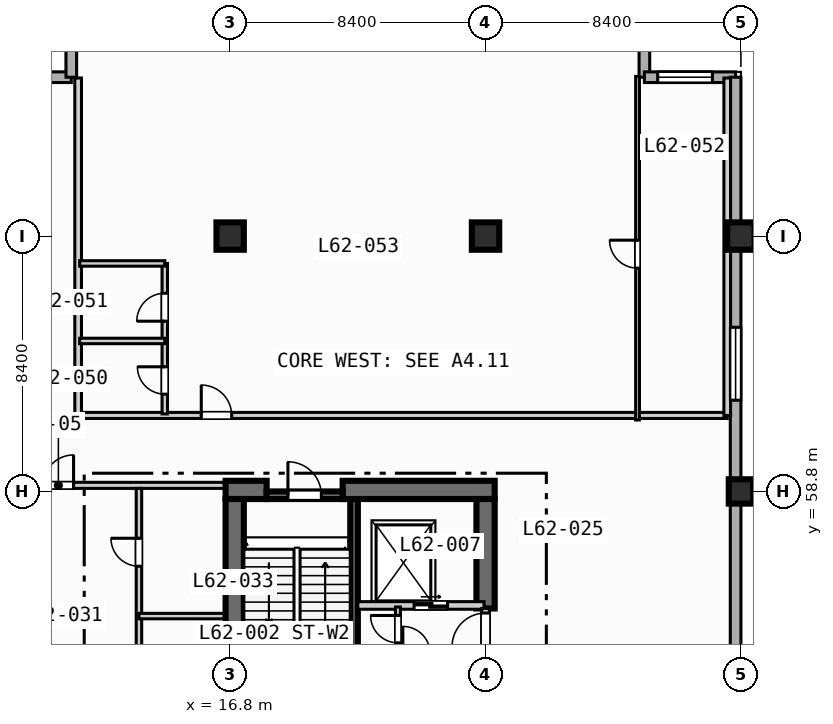
"""IFC4 building model, lengths in metres.
Left out: names, types, materials, properties, quantities, classifications, styles, units other than length and angle.
Written with IfcOpenShell. Run it as: python <this file> out.ifc"""

import sys

from ifc_helpers import new_model, si_unit, direction, frame, frame_2d, origin, origin_2d, place, context, subcontext, project, spatial, rectangle, extrude, element, fill, save


model = new_model("IFC4")
c1 = context("Model", 3, precision=1e-05, world=origin(), true_north=direction((0.0, 1.0)))
c2 = subcontext(c1, "Body", "Model", "MODEL_VIEW")
j1 = project(units=[si_unit("LENGTHUNIT", "METRE"), si_unit("PLANEANGLEUNIT", "RADIAN")], contexts=[c1])
p1 = place(None, origin())
s1 = spatial("IfcSite", under=j1, at=p1, CompositionType="ELEMENT")
p2 = place(p1, origin())
s2 = spatial("IfcBuilding", under=s1, at=p2, CompositionType="ELEMENT")
p3 = place(p2, frame((0.0, 0.0, 252.7)))
s3 = spatial("IfcBuildingStorey", under=s2, at=p3, CompositionType="ELEMENT", Elevation=252.7)
p4 = place(p3, frame((20.875, 50.5, 0.0), z_axis=(0.0, 0.0, 1.0), x_axis=(0.0, 1.0, 0.0)))
e1 = element("IfcWall", 1, at=p4, inside=s3, PredefinedType="SOLIDWALL", context=c2, shape_type="SweptSolid", body=[
    extrude(rectangle(XDim=8.05, YDim=0.25, at=frame_2d((4.025, 0.0))), origin(), (0.0, 0.0, 1.0), 3.47),
])
p5 = place(p3, frame((16.65, 58.85, 0.0), z_axis=(0.0, 0.0, 1.0), x_axis=(1.0, 0.0, 0.0)))
e2 = element("IfcWall", 2, at=p5, inside=s3, PredefinedType="SHEAR", context=c2, shape_type="SweptSolid", body=[
    extrude(rectangle(XDim=1.35, YDim=0.6, at=frame_2d((0.675, 0.0))), origin(), (0.0, 0.0, 1.0), 3.47),
])
p6 = place(p3, frame((20.5, 58.85, 0.0), z_axis=(0.0, 0.0, 1.0), x_axis=(1.0, 0.0, 0.0)))
e3 = element("IfcWall", 3, at=p6, inside=s3, PredefinedType="SHEAR", context=c2, shape_type="SweptSolid", body=[
    extrude(rectangle(XDim=5.0, YDim=0.6, at=frame_2d((2.5, 0.0))), origin(), (0.0, 0.0, 1.0), 3.47),
])
p7 = place(p3, frame((16.95, 42.2, 0.0), z_axis=(0.0, 0.0, 1.0), x_axis=(0.0, 1.0, 0.0)))
e4 = element("IfcWall", 4, at=p7, inside=s3, PredefinedType="SHEAR", context=c2, shape_type="SweptSolid", body=[
    extrude(rectangle(XDim=16.35, YDim=0.6, at=frame_2d((8.175, 0.0))), origin(), (0.0, 0.0, 1.0), 3.47),
])
p8 = place(p3, frame((25.2, 54.95, 0.0), z_axis=(0.0, 0.0, 1.0), x_axis=(0.0, 1.0, 0.0)))
e5 = element("IfcWall", 5, at=p8, inside=s3, PredefinedType="SHEAR", context=c2, shape_type="SweptSolid", body=[
    extrude(rectangle(XDim=3.6, YDim=0.6, at=frame_2d((1.8, 0.0))), origin(), (0.0, 0.0, 1.0), 3.47),
])
for number, where, z_axis, x_axis in (
    (6, (16.8, 67.2, 0.0), (0.0, 0.0, 1.0), (1.0, 0.0, 0.0)),
    (7, (25.2, 67.2, 0.0), (0.0, 0.0, 1.0), (1.0, 0.0, 0.0)),
):
    element("IfcColumn", number, at=place(p3, frame(where, z_axis=z_axis, x_axis=x_axis)), inside=s3, PredefinedType="COLUMN", context=c2, shape_type="SweptSolid", body=[
        extrude(rectangle(XDim=0.9, YDim=0.9, at=origin_2d()), origin(), (0.0, 0.0, 1.0), 3.7),
    ])
p9 = place(p3, frame((33.6, 58.8, 0.0), z_axis=(0.0, 0.0, 1.0), x_axis=(1.0, 0.0, 0.0)))
e8 = element("IfcColumn", 8, at=p9, inside=s3, PredefinedType="COLUMN", context=c2, shape_type="SweptSolid", body=[
    extrude(rectangle(XDim=0.8, YDim=0.8, at=origin_2d()), origin(), (0.0, 0.0, 1.0), 3.7),
])
p10 = place(p3, frame((33.6, 67.2, 0.0), z_axis=(0.0, 0.0, 1.0), x_axis=(1.0, 0.0, 0.0)))
e9 = element("IfcColumn", 9, at=p10, inside=s3, PredefinedType="COLUMN", context=c2, shape_type="SweptSolid", body=[
    extrude(rectangle(XDim=0.9, YDim=0.9, at=origin_2d()), origin(), (0.0, 0.0, 1.0), 3.7),
])
for number, where, z_axis, x_axis in (
    (10, (8.575, 72.425, 0.0), (0.0, 0.0, 1.0), (1.0, 0.0, 0.0)),
    (11, (11.575, 72.425, 0.0), (0.0, 0.0, 1.0), (0.0, 1.0, 0.0)),
    (12, (30.425, 75.425, 0.0), (0.0, 0.0, 1.0), (0.0, -1.0, 0.0)),
):
    element("IfcWall", number, at=place(p3, frame(where, z_axis=z_axis, x_axis=x_axis)), inside=s3, PredefinedType="STANDARD", context=c2, shape_type="SweptSolid", body=[
        extrude(rectangle(XDim=3.0, YDim=0.35, at=frame_2d((1.5, 0.0))), origin(), (0.0, 0.0, 1.0), 3.47),
    ])
p11 = place(p3, frame((30.425, 72.425, 0.0), z_axis=(0.0, 0.0, 1.0), x_axis=(1.0, 0.0, 0.0)))
e13 = element("IfcWall", 13, at=p11, inside=s3, PredefinedType="STANDARD", context=c2, shape_type="SweptSolid", body=[
    extrude(rectangle(XDim=3.0, YDim=0.35, at=frame_2d((1.5, 0.0))), origin(), (0.0, 0.0, 1.0), 3.47),
])
p12 = place(p11, frame((0.438, 0.0, 0.85)))
e14 = element("IfcOpeningElement", 14, at=p12, cuts=e13, PredefinedType="OPENING", context=c2, shape_type="SweptSolid", body=[
    extrude(rectangle(XDim=1.8, YDim=1.8, at=frame_2d((0.9, 0.9))), frame((0.0, 0.185, 0.0), z_axis=(0.0, -1.0, 0.0), x_axis=(1.0, 0.0, 0.0)), (0.0, 0.0, 1.0), 0.37),
])
p13 = place(p3, frame((33.425, 72.425, 0.0), z_axis=(0.0, 0.0, 1.0), x_axis=(0.0, -1.0, 0.0)))
e15 = element("IfcWall", 15, at=p13, inside=s3, PredefinedType="STANDARD", context=c2, shape_type="SweptSolid", body=[
    extrude(rectangle(XDim=39.0, YDim=0.35, at=frame_2d((19.5, 0.0))), origin(), (0.0, 0.0, 1.0), 3.47),
])
p14 = place(p13, frame((33.725, 0.0, 0.85)))
e16 = element("IfcOpeningElement", 16, at=p14, cuts=e15, PredefinedType="OPENING", context=c2, shape_type="SweptSolid", body=[
    extrude(rectangle(XDim=1.8, YDim=1.8, at=frame_2d((0.9, 0.9))), frame((0.0, 0.185, 0.0), z_axis=(0.0, -1.0, 0.0), x_axis=(1.0, 0.0, 0.0)), (0.0, 0.0, 1.0), 0.37),
])
p15 = place(p13, frame((8.225, 0.0, 0.85)))
e17 = element("IfcOpeningElement", 17, at=p15, cuts=e15, PredefinedType="OPENING", context=c2, shape_type="SweptSolid", body=[
    extrude(rectangle(XDim=2.4, YDim=1.95, at=frame_2d((1.2, 0.975))), frame((0.0, 0.185, 0.0), z_axis=(0.0, -1.0, 0.0), x_axis=(1.0, 0.0, 0.0)), (0.0, 0.0, 1.0), 0.37),
])
p16 = place(p3, frame((18.0, 58.675, 0.0), z_axis=(0.0, 0.0, 1.0), x_axis=(1.0, 0.0, 0.0)))
e18 = element("IfcWall", 18, at=p16, inside=s3, PredefinedType="SOLIDWALL", context=c2, shape_type="SweptSolid", body=[
    extrude(rectangle(XDim=2.5, YDim=0.25, at=frame_2d((1.25, 0.0))), origin(), (0.0, 0.0, 1.0), 3.47),
])
p17 = place(p16, frame((0.7, 0.0, 0.0)))
e19 = element("IfcOpeningElement", 19, at=p17, cuts=e18, PredefinedType="OPENING", context=c2, shape_type="SweptSolid", body=[
    extrude(rectangle(XDim=1.1, YDim=2.15, at=frame_2d((0.55, 1.075))), frame((0.0, 0.135, 0.0), z_axis=(0.0, -1.0, 0.0), x_axis=(1.0, 0.0, 0.0)), (0.0, 0.0, 1.0), 0.27),
])
p18 = place(p3, frame((21.0, 55.05, 0.0), z_axis=(0.0, 0.0, 1.0), x_axis=(1.0, 0.0, 0.0)))
e20 = element("IfcWall", 20, at=p18, inside=s3, PredefinedType="SOLIDWALL", context=c2, shape_type="SweptSolid", body=[
    extrude(rectangle(XDim=4.15, YDim=0.25, at=frame_2d((2.075, 0.0))), origin(), (0.0, 0.0, 1.0), 3.47),
])
p19 = place(p18, frame((1.85, 0.0, 0.0)))
e21 = element("IfcOpeningElement", 21, at=p19, cuts=e20, PredefinedType="OPENING", context=c2, shape_type="SweptSolid", body=[
    extrude(rectangle(XDim=1.1, YDim=2.15, at=frame_2d((0.55, 1.075))), frame((0.0, 0.135, 0.0), z_axis=(0.0, -1.0, 0.0), x_axis=(1.0, 0.0, 0.0)), (0.0, 0.0, 1.0), 0.27),
])
p20 = place(p3, frame((25.2, 53.55, 0.0), z_axis=(0.0, 0.0, 1.0), x_axis=(0.0, 1.0, 0.0)))
e22 = element("IfcWall", 22, at=p20, inside=s3, PredefinedType="SOLIDWALL", context=c2, shape_type="SweptSolid", body=[
    extrude(rectangle(XDim=1.4, YDim=0.25, at=frame_2d((0.7, 0.0))), origin(), (0.0, 0.0, 1.0), 3.47),
])
p21 = place(p20, frame((0.15, 0.0, 0.0)))
e23 = element("IfcOpeningElement", 23, at=p21, cuts=e22, PredefinedType="OPENING", context=c2, shape_type="SweptSolid", body=[
    extrude(rectangle(XDim=1.1, YDim=2.15, at=frame_2d((0.55, 1.075))), frame((0.0, 0.135, 0.0), z_axis=(0.0, -1.0, 0.0), x_axis=(1.0, 0.0, 0.0)), (0.0, 0.0, 1.0), 0.27),
])
p22 = place(p3, frame((22.32, 53.56, 0.0), z_axis=(0.0, 0.0, 1.0), x_axis=(0.0, 1.0, 0.0)))
e24 = element("IfcWall", 24, at=p22, inside=s3, PredefinedType="PARTITIONING", context=c2, shape_type="SweptSolid", body=[
    extrude(rectangle(XDim=1.44, YDim=0.16, at=frame_2d((0.72, 0.0))), origin(), (0.0, 0.0, 1.0), 3.47),
])
p23 = place(p22, frame((0.26, 0.0, 0.0)))
e25 = element("IfcOpeningElement", 25, at=p23, cuts=e24, PredefinedType="OPENING", context=c2, shape_type="SweptSolid", body=[
    extrude(rectangle(XDim=0.9, YDim=2.1, at=frame_2d((0.45, 1.05))), frame((0.0, 0.09, 0.0), z_axis=(0.0, -1.0, 0.0), x_axis=(1.0, 0.0, 0.0)), (0.0, 0.0, 1.0), 0.18),
])
p24 = place(p3, frame((8.65, 59.0, 0.0), z_axis=(0.0, 0.0, 1.0), x_axis=(1.0, 0.0, 0.0)))
e26 = element("IfcWall", 26, at=p24, inside=s3, PredefinedType="PARTITIONING", context=c2, shape_type="SweptSolid", body=[
    extrude(rectangle(XDim=7.95, YDim=0.2, at=frame_2d((3.975, 0.0))), origin(), (0.0, 0.0, 1.0), 2.82),
])
p25 = place(p24, frame((2.0, 0.0, 0.0)))
e27 = element("IfcOpeningElement", 27, at=p25, cuts=e26, PredefinedType="OPENING", context=c2, shape_type="SweptSolid", body=[
    extrude(rectangle(XDim=1.0, YDim=2.15, at=frame_2d((0.5, 1.075))), frame((0.0, 0.11, 0.0), z_axis=(0.0, -1.0, 0.0), x_axis=(1.0, 0.0, 0.0)), (0.0, 0.0, 1.0), 0.22),
])
p26 = place(p3, frame((13.8, 50.5, 0.0), z_axis=(0.0, 0.0, 1.0), x_axis=(0.0, 1.0, 0.0)))
e28 = element("IfcWall", 28, at=p26, inside=s3, PredefinedType="PLUMBINGWALL", context=c2, shape_type="SweptSolid", body=[
    extrude(rectangle(XDim=8.4, YDim=0.18, at=frame_2d((4.2, 0.0))), origin(), (0.0, 0.0, 1.0), 3.47),
])
p27 = place(p26, frame((1.65, 0.0, 0.0)))
e29 = element("IfcOpeningElement", 29, at=p27, cuts=e28, PredefinedType="OPENING", context=c2, shape_type="SweptSolid", body=[
    extrude(rectangle(XDim=0.9, YDim=2.1, at=frame_2d((0.45, 1.05))), frame((0.0, 0.1, 0.0), z_axis=(0.0, -1.0, 0.0), x_axis=(1.0, 0.0, 0.0)), (0.0, 0.0, 1.0), 0.2),
])
p28 = place(p26, frame((5.84, 0.0, 0.0)))
e30 = element("IfcOpeningElement", 30, at=p28, cuts=e28, PredefinedType="OPENING", context=c2, shape_type="SweptSolid", body=[
    extrude(rectangle(XDim=0.92, YDim=2.1, at=frame_2d((0.46, 1.05))), frame((0.0, 0.1, 0.0), z_axis=(0.0, -1.0, 0.0), x_axis=(1.0, 0.0, 0.0)), (0.0, 0.0, 1.0), 0.2),
])
p29 = place(p3, frame((13.8, 54.7, 0.0), z_axis=(0.0, 0.0, 1.0), x_axis=(1.0, 0.0, 0.0)))
e31 = element("IfcWall", 31, at=p29, inside=s3, PredefinedType="PLUMBINGWALL", context=c2, shape_type="SweptSolid", body=[
    extrude(rectangle(XDim=2.8, YDim=0.18, at=frame_2d((1.4, 0.0))), origin(), (0.0, 0.0, 1.0), 3.47),
])
p30 = place(p3, frame((11.8, 61.3, 0.0), z_axis=(0.0, 0.0, 1.0), x_axis=(1.0, 0.0, 0.0)))
e32 = element("IfcWall", 32, at=p30, inside=s3, PredefinedType="PARTITIONING", context=c2, shape_type="SweptSolid", body=[
    extrude(rectangle(XDim=21.35, YDim=0.2, at=frame_2d((10.675, 0.0))), origin(), (0.0, 0.0, 1.0), 3.47),
])
p31 = place(p30, frame((4.05, 0.0, 0.0)))
e33 = element("IfcOpeningElement", 33, at=p31, cuts=e32, PredefinedType="OPENING", context=c2, shape_type="SweptSolid", body=[
    extrude(rectangle(XDim=1.0, YDim=2.15, at=frame_2d((0.5, 1.075))), frame((0.0, 0.11, 0.0), z_axis=(0.0, -1.0, 0.0), x_axis=(1.0, 0.0, 0.0)), (0.0, 0.0, 1.0), 0.22),
])
for number, where, z_axis, x_axis in (
    (34, (33.15, 61.3, 0.0), (0.0, 0.0, 1.0), (0.0, 1.0, 0.0)),
    (35, (11.8, 61.3, 0.0), (0.0, 0.0, 1.0), (0.0, 1.0, 0.0)),
):
    element("IfcWall", number, at=place(p3, frame(where, z_axis=z_axis, x_axis=x_axis)), inside=s3, PredefinedType="PARTITIONING", context=c2, shape_type="SweptSolid", body=[
        extrude(rectangle(XDim=11.1, YDim=0.22, at=frame_2d((5.55, 0.0))), origin(), (0.0, 0.0, 1.0), 3.47),
    ])
p32 = place(p3, frame((14.65, 61.35, 0.0), z_axis=(0.0, 0.0, 1.0), x_axis=(0.0, 1.0, 0.0)))
e36 = element("IfcWall", 36, at=p32, inside=s3, PredefinedType="PLUMBINGWALL", context=c2, shape_type="SweptSolid", body=[
    extrude(rectangle(XDim=4.95, YDim=0.18, at=frame_2d((2.475, 0.0))), origin(), (0.0, 0.0, 1.0), 3.47),
])
p33 = place(p32, frame((0.65, 0.0, 0.0)))
e37 = element("IfcOpeningElement", 37, at=p33, cuts=e36, PredefinedType="OPENING", context=c2, shape_type="SweptSolid", body=[
    extrude(rectangle(XDim=0.9, YDim=2.1, at=frame_2d((0.45, 1.05))), frame((0.0, 0.1, 0.0), z_axis=(0.0, -1.0, 0.0), x_axis=(1.0, 0.0, 0.0)), (0.0, 0.0, 1.0), 0.2),
])
p34 = place(p32, frame((3.05, 0.0, 0.0)))
e38 = element("IfcOpeningElement", 38, at=p34, cuts=e36, PredefinedType="OPENING", context=c2, shape_type="SweptSolid", body=[
    extrude(rectangle(XDim=0.92, YDim=2.1, at=frame_2d((0.46, 1.05))), frame((0.0, 0.1, 0.0), z_axis=(0.0, -1.0, 0.0), x_axis=(1.0, 0.0, 0.0)), (0.0, 0.0, 1.0), 0.2),
])
for number, where, z_axis, x_axis in (
    (39, (11.85, 63.75, 0.0), (0.0, 0.0, 1.0), (1.0, 0.0, 0.0)),
    (40, (11.85, 66.3, 0.0), (0.0, 0.0, 1.0), (1.0, 0.0, 0.0)),
):
    element("IfcWall", number, at=place(p3, frame(where, z_axis=z_axis, x_axis=x_axis)), inside=s3, PredefinedType="PLUMBINGWALL", context=c2, shape_type="SweptSolid", body=[
        extrude(rectangle(XDim=2.8, YDim=0.18, at=frame_2d((1.4, 0.0))), origin(), (0.0, 0.0, 1.0), 3.47),
    ])
p35 = place(p3, frame((30.2, 61.15, 0.0), z_axis=(0.0, 0.0, 1.0), x_axis=(0.0, 1.0, 0.0)))
e41 = element("IfcWall", 41, at=p35, inside=s3, PredefinedType="PARTITIONING", context=c2, shape_type="SweptSolid", body=[
    extrude(rectangle(XDim=11.3, YDim=0.125, at=frame_2d((5.65, 0.0))), origin(), (0.0, 0.0, 1.0), 3.47),
])
p36 = place(p35, frame((4.995, 0.0, 0.0)))
e42 = element("IfcOpeningElement", 42, at=p36, cuts=e41, PredefinedType="OPENING", context=c2, shape_type="SweptSolid", body=[
    extrude(rectangle(XDim=0.92, YDim=2.1, at=frame_2d((0.46, 1.05))), frame((0.0, 0.073, 0.0), z_axis=(0.0, -1.0, 0.0), x_axis=(1.0, 0.0, 0.0)), (0.0, 0.0, 1.0), 0.145),
])
p37 = place(p12, origin())
e43 = element("IfcWindow", 43, at=p37, inside=s3, PartitioningType="SINGLE_PANEL", PredefinedType="WINDOW", context=c2, shape_type="SweptSolid", body=[
    extrude(rectangle(XDim=1.8, YDim=1.8, at=frame_2d((0.9, 0.9))), frame((0.0, 0.03, 0.0), z_axis=(0.0, -1.0, 0.0), x_axis=(1.0, 0.0, 0.0)), (0.0, 0.0, 1.0), 0.06),
])
fill(e14, e43)
p38 = place(p15, origin())
e44 = element("IfcWindow", 44, at=p38, inside=s3, PartitioningType="SINGLE_PANEL", PredefinedType="WINDOW", context=c2, shape_type="SweptSolid", body=[
    extrude(rectangle(XDim=2.4, YDim=1.95, at=frame_2d((1.2, 0.975))), frame((0.0, 0.03, 0.0), z_axis=(0.0, -1.0, 0.0), x_axis=(1.0, 0.0, 0.0)), (0.0, 0.0, 1.0), 0.06),
])
fill(e17, e44)
p39 = place(p17, origin())
e45 = element("IfcDoor", 45, at=p39, inside=s3, OperationType="SINGLE_SWING_LEFT", PredefinedType="DOOR", context=c2, shape_type="SweptSolid", body=[
    extrude(rectangle(XDim=1.1, YDim=2.15, at=frame_2d((0.55, 1.075))), frame((0.0, 0.025, 0.0), z_axis=(0.0, -1.0, 0.0), x_axis=(1.0, 0.0, 0.0)), (0.0, 0.0, 1.0), 0.05),
])
fill(e19, e45)
p40 = place(p19, origin())
e46 = element("IfcDoor", 46, at=p40, inside=s3, OperationType="SLIDING_TO_LEFT", PredefinedType="DOOR", context=c2, shape_type="SweptSolid", body=[
    extrude(rectangle(XDim=1.1, YDim=2.15, at=frame_2d((0.55, 1.075))), frame((0.0, 0.025, 0.0), z_axis=(0.0, -1.0, 0.0), x_axis=(1.0, 0.0, 0.0)), (0.0, 0.0, 1.0), 0.05),
])
fill(e21, e46)
p41 = place(p21, origin())
e47 = element("IfcDoor", 47, at=p41, inside=s3, OperationType="SINGLE_SWING_LEFT", PredefinedType="DOOR", context=c2, shape_type="SweptSolid", body=[
    extrude(rectangle(XDim=1.1, YDim=2.15, at=frame_2d((0.55, 1.075))), frame((0.0, 0.025, 0.0), z_axis=(0.0, -1.0, 0.0), x_axis=(1.0, 0.0, 0.0)), (0.0, 0.0, 1.0), 0.05),
])
fill(e23, e47)
p42 = place(p23, origin())
e48 = element("IfcDoor", 48, at=p42, inside=s3, OperationType="SINGLE_SWING_RIGHT", PredefinedType="DOOR", context=c2, shape_type="SweptSolid", body=[
    extrude(rectangle(XDim=0.9, YDim=2.1, at=frame_2d((0.45, 1.05))), frame((0.0, 0.025, 0.0), z_axis=(0.0, -1.0, 0.0), x_axis=(1.0, 0.0, 0.0)), (0.0, 0.0, 1.0), 0.05),
])
fill(e25, e48)
p43 = place(p25, origin())
e49 = element("IfcDoor", 49, at=p43, inside=s3, OperationType="SINGLE_SWING_RIGHT", PredefinedType="DOOR", context=c2, shape_type="SweptSolid", body=[
    extrude(rectangle(XDim=1.0, YDim=2.15, at=frame_2d((0.5, 1.075))), frame((0.0, 0.025, 0.0), z_axis=(0.0, -1.0, 0.0), x_axis=(1.0, 0.0, 0.0)), (0.0, 0.0, 1.0), 0.05),
])
fill(e27, e49)
p44 = place(p28, origin())
e50 = element("IfcDoor", 50, at=p44, inside=s3, OperationType="SINGLE_SWING_RIGHT", PredefinedType="DOOR", context=c2, shape_type="SweptSolid", body=[
    extrude(rectangle(XDim=0.92, YDim=2.1, at=frame_2d((0.46, 1.05))), frame((0.0, 0.025, 0.0), z_axis=(0.0, -1.0, 0.0), x_axis=(1.0, 0.0, 0.0)), (0.0, 0.0, 1.0), 0.05),
])
fill(e30, e50)
p45 = place(p31, origin())
e51 = element("IfcDoor", 51, at=p45, inside=s3, OperationType="SINGLE_SWING_LEFT", PredefinedType="DOOR", context=c2, shape_type="SweptSolid", body=[
    extrude(rectangle(XDim=1.0, YDim=2.15, at=frame_2d((0.5, 1.075))), frame((0.0, 0.025, 0.0), z_axis=(0.0, -1.0, 0.0), x_axis=(1.0, 0.0, 0.0)), (0.0, 0.0, 1.0), 0.05),
])
fill(e33, e51)
p46 = place(p33, origin())
e52 = element("IfcDoor", 52, at=p46, inside=s3, OperationType="SINGLE_SWING_RIGHT", PredefinedType="DOOR", context=c2, shape_type="SweptSolid", body=[
    extrude(rectangle(XDim=0.9, YDim=2.1, at=frame_2d((0.45, 1.05))), frame((0.0, 0.025, 0.0), z_axis=(0.0, -1.0, 0.0), x_axis=(1.0, 0.0, 0.0)), (0.0, 0.0, 1.0), 0.05),
])
fill(e37, e52)
p47 = place(p34, origin())
e53 = element("IfcDoor", 53, at=p47, inside=s3, OperationType="SINGLE_SWING_LEFT", PredefinedType="DOOR", context=c2, shape_type="SweptSolid", body=[
    extrude(rectangle(XDim=0.92, YDim=2.1, at=frame_2d((0.46, 1.05))), frame((0.0, 0.025, 0.0), z_axis=(0.0, -1.0, 0.0), x_axis=(1.0, 0.0, 0.0)), (0.0, 0.0, 1.0), 0.05),
])
fill(e38, e53)
p48 = place(p36, origin())
e54 = element("IfcDoor", 54, at=p48, inside=s3, OperationType="SINGLE_SWING_RIGHT", PredefinedType="DOOR", context=c2, shape_type="SweptSolid", body=[
    extrude(rectangle(XDim=0.92, YDim=2.1, at=frame_2d((0.46, 1.05))), frame((0.0, 0.025, 0.0), z_axis=(0.0, -1.0, 0.0), x_axis=(1.0, 0.0, 0.0)), (0.0, 0.0, 1.0), 0.05),
])
fill(e42, e54)
save(model, sys.argv[1])
